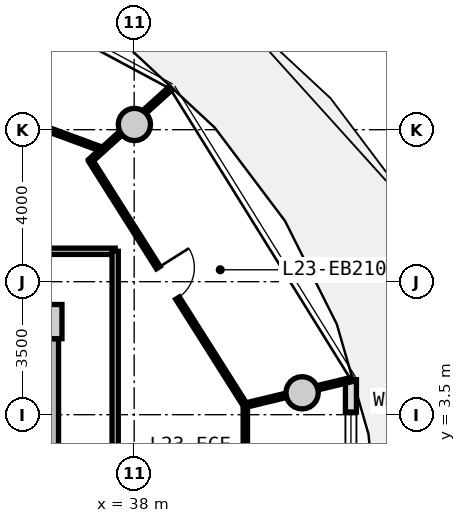
"""IFC4 building model, lengths in metres.
Left out: names, types, materials, properties, quantities, classifications, styles, units other than length and angle.
Written with IfcOpenShell. Run it as: python <this file> out.ifc"""

import sys

from ifc_helpers import new_model, si_unit, direction, frame, frame_2d, origin, origin_2d, place, context, subcontext, project, spatial, rectangle, circle, extrude, source, transform, mapped, element, fill, save


model = new_model("IFC4")
c1 = context("Model", 3, precision=1e-05, world=origin(), true_north=direction((0.0, 1.0)))
c2 = subcontext(c1, "Body", "Model", "MODEL_VIEW")
j1 = project(units=[si_unit("LENGTHUNIT", "METRE"), si_unit("PLANEANGLEUNIT", "RADIAN")], contexts=[c1])
p1 = place(None, origin())
s1 = spatial("IfcSite", under=j1, at=p1, CompositionType="ELEMENT")
p2 = place(p1, origin())
s2 = spatial("IfcBuilding", under=s1, at=p2, CompositionType="ELEMENT")
p3 = place(p2, frame((0.0, 0.0, 77.95)))
s3 = spatial("IfcBuildingStorey", under=s2, at=p3, CompositionType="ELEMENT", Elevation=77.95)
m1 = source(origin(), c2, "Body", "SweptSolid", [
    extrude(rectangle(XDim=0.9, YDim=0.9, at=origin_2d()), origin(), (0.0, 0.0, 1.0), 3.05),
])
p4 = place(p3, frame((35.65, 5.95, 0.0), z_axis=(0.0, 0.0, 1.0), x_axis=(1.0, 0.0, 0.0)))
e1 = element("IfcColumn", 1, at=p4, inside=s3, PredefinedType="COLUMN", context=c2, shape_type="MappedRepresentation", body=[
    mapped(m1, transform((0.0, 0.0, 0.0), x_axis=(1.0, 0.0, 0.0), y_axis=(0.0, 1.0, 0.0), z_axis=(0.0, 0.0, 1.0), scale=1.0)),
])
m2 = source(origin(), c2, "Body", "SweptSolid", [
    extrude(rectangle(XDim=11.0, YDim=0.72, at=frame_2d((5.5, 0.0))), origin(), (0.0, 0.0, 1.0), 2.79),
])
p5 = place(p3, frame((35.65, 5.5, 0.0), z_axis=(0.0, 0.0, 1.0), x_axis=(0.0, -1.0, 0.0)))
e2 = element("IfcWall", 2, at=p5, inside=s3, PredefinedType="SHEAR", context=c2, shape_type="MappedRepresentation", body=[
    mapped(m2, transform((0.0, 0.0, 0.0), x_axis=(1.0, 0.0, 0.0), y_axis=(0.0, 1.0, 0.0), z_axis=(0.0, 0.0, 1.0), scale=1.0)),
])
p6 = place(p5, frame((5.65, 0.0, 0.0)))
e3 = element("IfcOpeningElement", 3, at=p6, cuts=e2, PredefinedType="OPENING", context=c2, shape_type="SweptSolid", body=[
    extrude(rectangle(XDim=1.2, YDim=2.15, at=frame_2d((0.6, 1.075))), frame((0.0, 0.37, 0.0), z_axis=(0.0, -1.0, 0.0), x_axis=(1.0, 0.0, 0.0)), (0.0, 0.0, 1.0), 0.74),
])
p7 = place(p5, frame((9.3, 0.0, 0.0)))
e4 = element("IfcOpeningElement", 4, at=p7, cuts=e2, PredefinedType="OPENING", context=c2, shape_type="SweptSolid", body=[
    extrude(rectangle(XDim=1.0, YDim=2.1, at=frame_2d((0.5, 1.05))), frame((0.0, 0.37, 0.0), z_axis=(0.0, -1.0, 0.0), x_axis=(1.0, 0.0, 0.0)), (0.0, 0.0, 1.0), 0.74),
])
m3 = source(origin(), c2, "Body", "SweptSolid", [
    extrude(circle(Radius=0.425, at=origin_2d()), origin(), (0.0, 0.0, 1.0), 3.47),
])
for number, where, z_axis, x_axis in (
    (5, (42.419, 4.076, -0.42), (0.0, 0.0, 1.0), (1.0, 0.0, 0.0)),
    (6, (38.006, 11.137, -0.42), (0.0, 0.0, 1.0), (1.0, 0.0, 0.0)),
):
    element("IfcColumn", number, at=place(p3, frame(where, z_axis=z_axis, x_axis=x_axis)), inside=s3, PredefinedType="COLUMN", context=c2, shape_type="MappedRepresentation", body=[
        mapped(m3, transform((0.0, 0.0, 0.0), x_axis=(1.0, 0.0, 0.0), y_axis=(0.0, 1.0, 0.0), z_axis=(0.0, 0.0, 1.0), scale=1.0)),
    ])
m4 = source(origin(), c2, "Body", "SweptSolid", [
    extrude(rectangle(XDim=8.841, YDim=0.29, at=frame_2d((4.421, 0.0))), origin(), (0.0, 0.0, 1.0), 2.79),
])
p8 = place(p3, frame((43.704, 4.421, 0.0), z_axis=(0.0, 0.0, 1.0), x_axis=(0.0, -1.0, 0.0)))
e7 = element("IfcWall", 7, at=p8, inside=s3, PredefinedType="SOLIDWALL", context=c2, shape_type="MappedRepresentation", body=[
    mapped(m4, transform((0.0, 0.0, 0.0), x_axis=(1.0, 0.0, 0.0), y_axis=(0.0, 1.0, 0.0), z_axis=(0.0, 0.0, 1.0), scale=1.0)),
])
p9 = place(p8, frame((6.74, 0.0, 0.0)))
e8 = element("IfcOpeningElement", 8, at=p9, cuts=e7, PredefinedType="OPENING", context=c2, shape_type="SweptSolid", body=[
    extrude(rectangle(XDim=1.15, YDim=2.25, at=frame_2d((0.575, 1.125))), frame((0.0, 0.155, 0.0), z_axis=(0.0, -1.0, 0.0), x_axis=(1.0, 0.0, 0.0)), (0.0, 0.0, 1.0), 0.31),
])
p10 = place(p8, frame((0.85, 0.0, 0.85)))
e9 = element("IfcOpeningElement", 9, at=p10, cuts=e7, PredefinedType="OPENING", context=c2, shape_type="SweptSolid", body=[
    extrude(rectangle(XDim=1.2, YDim=1.5, at=frame_2d((0.6, 0.75))), frame((0.0, 0.155, 0.0), z_axis=(0.0, -1.0, 0.0), x_axis=(1.0, 0.0, 0.0)), (0.0, 0.0, 1.0), 0.31),
])
m5 = source(origin(), c2, "Body", "SweptSolid", [
    extrude(rectangle(XDim=19.0, YDim=0.165, at=frame_2d((9.5, 0.0))), origin(), (0.0, 0.0, 1.0), 2.775),
])
p11 = place(p3, frame((18.5, 7.8, 0.0), z_axis=(0.0, 0.0, 1.0), x_axis=(1.0, 0.0, 0.0)))
e10 = element("IfcWall", 10, at=p11, inside=s3, PredefinedType="PARTITIONING", context=c2, shape_type="MappedRepresentation", body=[
    mapped(m5, transform((0.0, 0.0, 0.0), x_axis=(1.0, 0.0, 0.0), y_axis=(0.0, 1.0, 0.0), z_axis=(0.0, 0.0, 1.0), scale=1.0)),
])
p12 = place(p11, frame((3.446, 0.0, 0.0)))
e11 = element("IfcOpeningElement", 11, at=p12, cuts=e10, PredefinedType="OPENING", context=c2, shape_type="SweptSolid", body=[
    extrude(rectangle(XDim=1.05, YDim=2.15, at=frame_2d((0.525, 1.075))), frame((0.0, 0.093, 0.0), z_axis=(0.0, -1.0, 0.0), x_axis=(1.0, 0.0, 0.0)), (0.0, 0.0, 1.0), 0.185),
])
m6 = source(origin(), c2, "Body", "SweptSolid", [
    extrude(rectangle(XDim=15.6, YDim=0.165, at=frame_2d((7.8, 0.0))), origin(), (0.0, 0.0, 1.0), 2.775),
])
p13 = place(p3, frame((37.5, 7.8, 0.0), z_axis=(0.0, 0.0, 1.0), x_axis=(0.0, -1.0, 0.0)))
e12 = element("IfcWall", 12, at=p13, inside=s3, PredefinedType="PARTITIONING", context=c2, shape_type="MappedRepresentation", body=[
    mapped(m6, transform((0.0, 0.0, 0.0), x_axis=(1.0, 0.0, 0.0), y_axis=(0.0, 1.0, 0.0), z_axis=(0.0, 0.0, 1.0), scale=1.0)),
])
p14 = place(p13, frame((6.87, 0.0, 0.0)))
e13 = element("IfcOpeningElement", 13, at=p14, cuts=e12, PredefinedType="OPENING", context=c2, shape_type="SweptSolid", body=[
    extrude(rectangle(XDim=1.05, YDim=2.15, at=frame_2d((0.525, 1.075))), frame((0.0, 0.093, 0.0), z_axis=(0.0, -1.0, 0.0), x_axis=(1.0, 0.0, 0.0)), (0.0, 0.0, 1.0), 0.185),
])
m7 = source(origin(), c2, "Body", "SweptSolid", [
    extrude(rectangle(XDim=7.499, YDim=0.115, at=frame_2d((3.75, 0.0))), origin(), (0.0, 0.0, 1.0), 2.775),
])
p15 = place(p3, frame((40.925, -3.75, 0.0), z_axis=(0.0, 0.0, 1.0), x_axis=(0.0, 1.0, 0.0)))
e14 = element("IfcWall", 14, at=p15, inside=s3, PredefinedType="PARTITIONING", context=c2, shape_type="MappedRepresentation", body=[
    mapped(m7, transform((0.0, 0.0, 0.0), x_axis=(1.0, 0.0, 0.0), y_axis=(0.0, 1.0, 0.0), z_axis=(0.0, 0.0, 1.0), scale=1.0)),
])
p16 = place(p15, frame((3.275, 0.0, 0.0)))
e15 = element("IfcOpeningElement", 15, at=p16, cuts=e14, PredefinedType="OPENING", context=c2, shape_type="SweptSolid", body=[
    extrude(rectangle(XDim=0.95, YDim=2.1, at=frame_2d((0.475, 1.05))), frame((0.0, 0.067, 0.0), z_axis=(0.0, -1.0, 0.0), x_axis=(1.0, 0.0, 0.0)), (0.0, 0.0, 1.0), 0.135),
])
m8 = source(origin(), c2, "Body", "SweptSolid", [
    extrude(rectangle(XDim=7.618, YDim=0.115, at=frame_2d((3.809, 0.0))), origin(), (0.0, 0.0, 1.0), 2.775),
])
p17 = place(p3, frame((40.923, 3.749, 0.0), z_axis=(0.0, 0.0, 1.0), x_axis=(-0.534316104929, 0.845284744931, 0.0)))
e16 = element("IfcWall", 16, at=p17, inside=s3, PredefinedType="PARTITIONING", context=c2, shape_type="MappedRepresentation", body=[
    mapped(m8, transform((0.0, 0.0, 0.0), x_axis=(1.0, 0.0, 0.0), y_axis=(0.0, 1.0, 0.0), z_axis=(0.0, 0.0, 1.0), scale=1.0)),
])
p18 = place(p17, frame((3.334, 0.0, 0.0)))
e17 = element("IfcOpeningElement", 17, at=p18, cuts=e16, PredefinedType="OPENING", context=c2, shape_type="SweptSolid", body=[
    extrude(rectangle(XDim=0.95, YDim=2.1, at=frame_2d((0.475, 1.05))), frame((0.0, 0.067, 0.0), z_axis=(0.0, -1.0, 0.0), x_axis=(1.0, 0.0, 0.0)), (0.0, 0.0, 1.0), 0.135),
])
m9 = source(origin(), c2, "Body", "SweptSolid", [
    extrude(rectangle(XDim=2.881, YDim=0.115, at=frame_2d((1.44, 0.0))), origin(), (0.0, 0.0, 1.0), 2.275),
])
p19 = place(p3, frame((40.923, 3.749, 0.0), z_axis=(0.0, 0.0, 1.0), x_axis=(0.972031524605, 0.234850410208, 0.0)))
e18 = element("IfcWall", 18, at=p19, inside=s3, PredefinedType="PARTITIONING", context=c2, shape_type="MappedRepresentation", body=[
    mapped(m9, transform((0.0, 0.0, 0.0), x_axis=(1.0, 0.0, 0.0), y_axis=(0.0, 1.0, 0.0), z_axis=(0.0, 0.0, 1.0), scale=1.0)),
])
m10 = source(origin(), c2, "Body", "SweptSolid", [
    extrude(rectangle(XDim=7.913, YDim=0.115, at=frame_2d((3.956, 0.0))), origin(), (0.0, 0.0, 1.0), 2.775),
])
p20 = place(p3, frame((37.164, 10.479, 0.0), z_axis=(0.0, 0.0, 1.0), x_axis=(-0.938495791702, 0.345290673141, 0.0)))
e19 = element("IfcWall", 19, at=p20, inside=s3, PredefinedType="PARTITIONING", context=c2, shape_type="MappedRepresentation", body=[
    mapped(m10, transform((0.0, 0.0, 0.0), x_axis=(1.0, 0.0, 0.0), y_axis=(0.0, 1.0, 0.0), z_axis=(0.0, 0.0, 1.0), scale=1.0)),
])
p21 = place(p20, frame((3.481, 0.0, 0.0)))
e20 = element("IfcOpeningElement", 20, at=p21, cuts=e19, PredefinedType="OPENING", context=c2, shape_type="SweptSolid", body=[
    extrude(rectangle(XDim=0.95, YDim=2.1, at=frame_2d((0.475, 1.05))), frame((0.0, 0.067, 0.0), z_axis=(0.0, -1.0, 0.0), x_axis=(1.0, 0.0, 0.0)), (0.0, 0.0, 1.0), 0.135),
])
m11 = source(origin(), c2, "Body", "SweptSolid", [
    extrude(rectangle(XDim=2.852, YDim=0.115, at=frame_2d((1.426, 0.0))), origin(), (0.0, 0.0, 1.0), 2.275),
])
p22 = place(p3, frame((36.844, 10.18, 0.0), z_axis=(0.0, 0.0, 1.0), x_axis=(0.742190556634, 0.670188911908, 0.0)))
e21 = element("IfcWall", 21, at=p22, inside=s3, PredefinedType="PARTITIONING", context=c2, shape_type="MappedRepresentation", body=[
    mapped(m11, transform((0.0, 0.0, 0.0), x_axis=(1.0, 0.0, 0.0), y_axis=(0.0, 1.0, 0.0), z_axis=(0.0, 0.0, 1.0), scale=1.0)),
])
m12 = source(origin(), c2, "Body", "SweptSolid", [
    extrude(rectangle(XDim=1.2, YDim=1.5, at=frame_2d((0.6, 0.75))), frame((0.0, 0.03, 0.0), z_axis=(0.0, -1.0, 0.0), x_axis=(1.0, 0.0, 0.0)), (0.0, 0.0, 1.0), 0.06),
])
p23 = place(p10, origin())
e22 = element("IfcWindow", 22, at=p23, inside=s3, PartitioningType="SINGLE_PANEL", PredefinedType="WINDOW", context=c2, shape_type="MappedRepresentation", body=[
    mapped(m12, transform((0.0, 0.0, 0.0), x_axis=(1.0, 0.0, 0.0), y_axis=(0.0, 1.0, 0.0), z_axis=(0.0, 0.0, 1.0), scale=1.0)),
])
fill(e9, e22)
m13 = source(origin(), c2, "Body", "SweptSolid", [
    extrude(rectangle(XDim=0.95, YDim=2.1, at=frame_2d((0.475, 1.05))), frame((0.0, 0.025, 0.0), z_axis=(0.0, -1.0, 0.0), x_axis=(1.0, 0.0, 0.0)), (0.0, 0.0, 1.0), 0.05),
])
p24 = place(p18, frame((0.95, 0.0, 0.0), z_axis=(0.0, 0.0, 1.0), x_axis=(-1.0, 0.0, 0.0)))
e23 = element("IfcDoor", 23, at=p24, inside=s3, OperationType="SINGLE_SWING_LEFT", PredefinedType="DOOR", context=c2, shape_type="MappedRepresentation", body=[
    mapped(m13, transform((0.0, 0.0, 0.0), x_axis=(1.0, 0.0, 0.0), y_axis=(0.0, 1.0, 0.0), z_axis=(0.0, 0.0, 1.0), scale=1.0)),
])
fill(e17, e23)
save(model, sys.argv[1])
